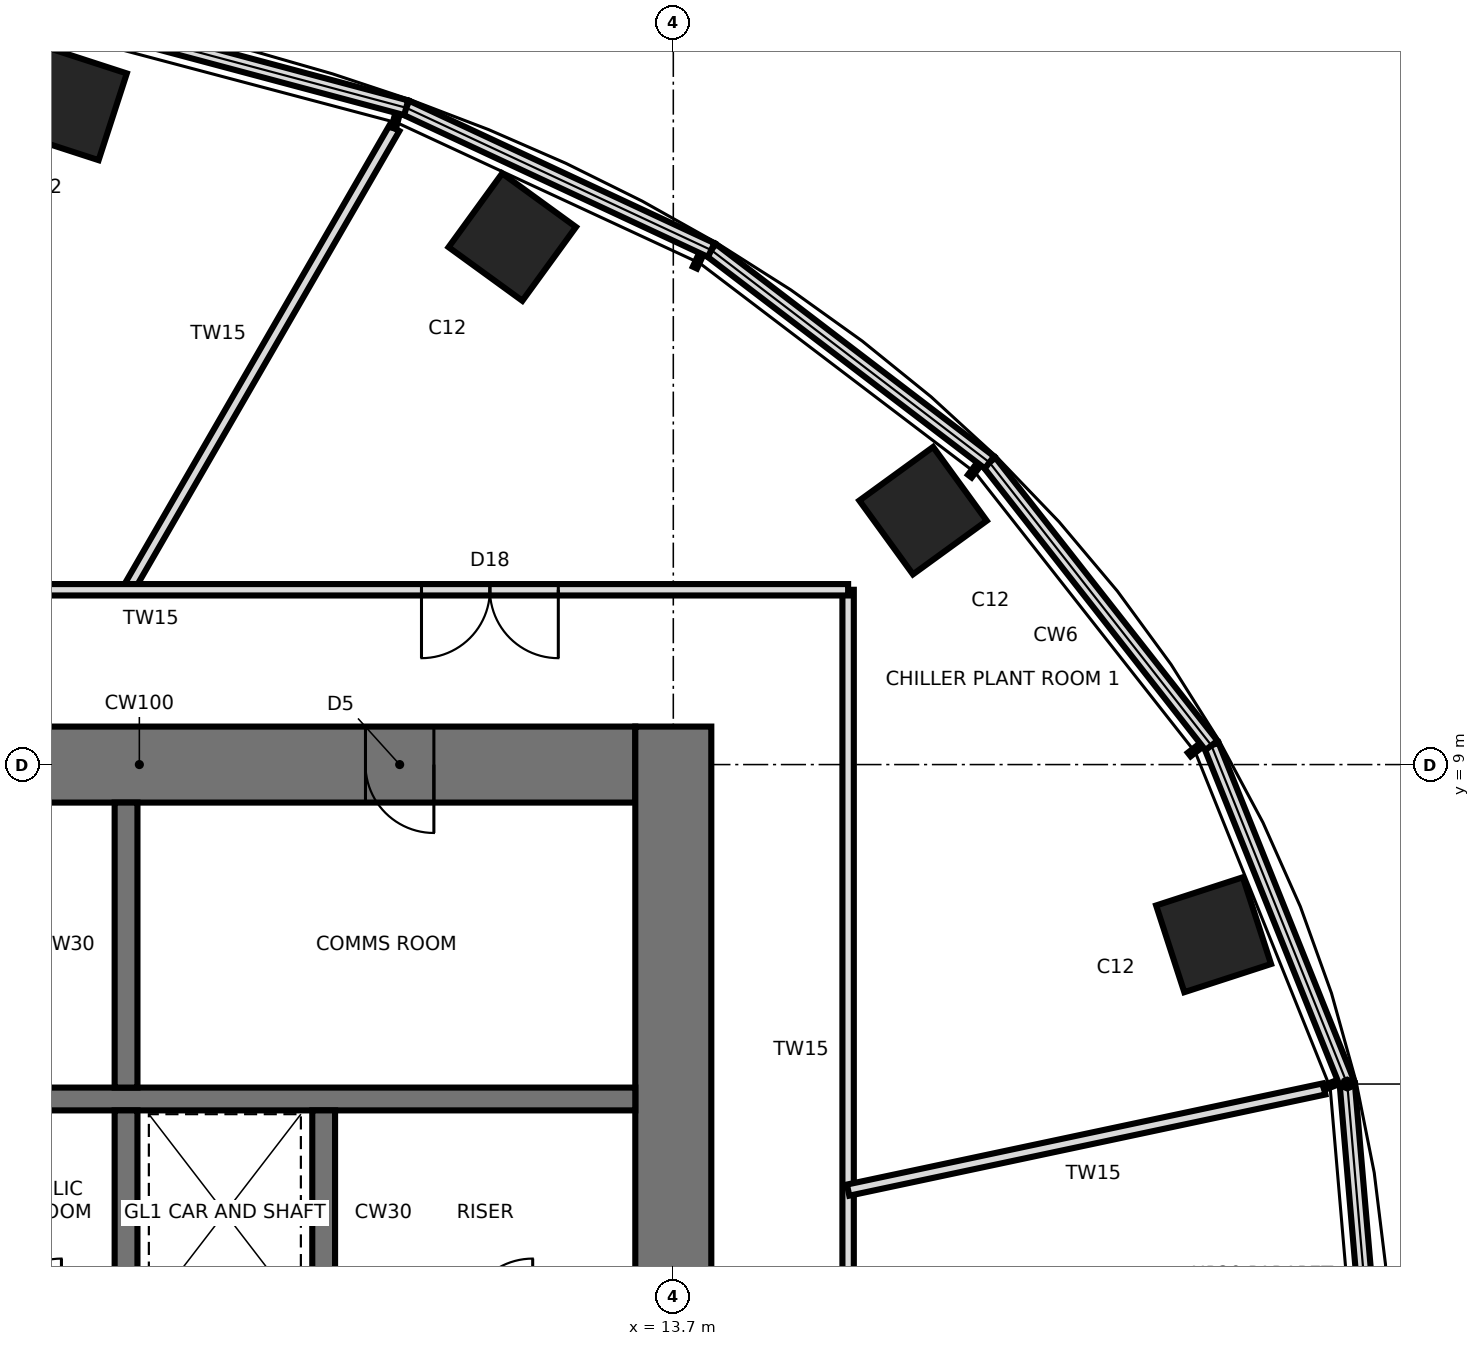
"""IFC4 building model, lengths in metres.
Left out: names, types, materials, properties, quantities, classifications, styles, units other than length and angle.
Written with IfcOpenShell. Run it as: python <this file> out.ifc"""

import sys

from ifc_helpers import new_model, si_unit, direction, frame, frame_2d, origin, origin_2d, place, context, subcontext, project, spatial, rectangle, extrude, element, fill, save


model = new_model("IFC4")
c1 = context("Model", 3, precision=1e-05, world=origin(), true_north=direction((0.0, 1.0)))
c2 = subcontext(c1, "Body", "Model", "MODEL_VIEW")
j1 = project(units=[si_unit("LENGTHUNIT", "METRE"), si_unit("PLANEANGLEUNIT", "RADIAN")], contexts=[c1])
p1 = place(None, origin())
s1 = spatial("IfcSite", under=j1, at=p1, CompositionType="ELEMENT")
p2 = place(p1, origin())
s2 = spatial("IfcBuilding", under=s1, at=p2, CompositionType="ELEMENT")
p3 = place(p2, frame((0.0, 0.0, 277.0)))
s3 = spatial("IfcBuildingStorey", under=s2, at=p3, CompositionType="ELEMENT", Elevation=277.0)
for number, where, z_axis, x_axis in (
    (1, (20.808, 6.761, 0.0), (0.0, 0.0, 1.0), (0.951, 0.309, 0.0)),
    (2, (16.986, 12.341, 0.0), (0.0, 0.0, 1.0), (0.809, 0.588, 0.0)),
    (3, (11.581, 15.94, 0.0), (0.0, 0.0, 1.0), (0.588, 0.809, 0.0)),
    (4, (5.754, 17.708, 0.0), (0.0, 0.0, 1.0), (0.309, 0.951, 0.0)),
):
    element("IfcColumn", number, at=place(p3, frame(where, z_axis=z_axis, x_axis=x_axis)), inside=s3, PredefinedType="COLUMN", context=c2, shape_type="SweptSolid", body=[
        extrude(rectangle(XDim=1.2, YDim=1.2, at=origin_2d()), origin(), (0.0, 0.0, 1.0), 5.0),
    ])
p4 = place(p3, frame((13.2, 9.0, 0.0), z_axis=(0.0, 0.0, 1.0), x_axis=(-1.0, 0.0, 0.0)))
e5 = element("IfcWall", 5, at=p4, inside=s3, PredefinedType="SHEAR", context=c2, shape_type="SweptSolid", body=[
    extrude(rectangle(XDim=26.4, YDim=1.0, at=frame_2d((13.2, 0.0))), origin(), (0.0, 0.0, 1.0), 5.0),
])
p5 = place(p4, frame((2.65, 0.0, 0.0)))
e6 = element("IfcOpeningElement", 6, at=p5, cuts=e5, PredefinedType="OPENING", context=c2, shape_type="SweptSolid", body=[
    extrude(rectangle(XDim=0.9, YDim=2.1, at=frame_2d((0.45, 1.05))), frame((0.0, 0.51, 0.0), z_axis=(0.0, -1.0, 0.0), x_axis=(1.0, 0.0, 0.0)), (0.0, 0.0, 1.0), 1.02),
])
p6 = place(p4, frame((9.5, 0.0, 0.0)))
e7 = element("IfcOpeningElement", 7, at=p6, cuts=e5, PredefinedType="OPENING", context=c2, shape_type="SweptSolid", body=[
    extrude(rectangle(XDim=0.9, YDim=2.1, at=frame_2d((0.45, 1.05))), frame((0.0, 0.51, 0.0), z_axis=(0.0, -1.0, 0.0), x_axis=(1.0, 0.0, 0.0)), (0.0, 0.0, 1.0), 1.02),
])
p7 = place(p4, frame((16.0, 0.0, 0.0)))
e8 = element("IfcOpeningElement", 8, at=p7, cuts=e5, PredefinedType="OPENING", context=c2, shape_type="SweptSolid", body=[
    extrude(rectangle(XDim=0.9, YDim=2.1, at=frame_2d((0.45, 1.05))), frame((0.0, 0.51, 0.0), z_axis=(0.0, -1.0, 0.0), x_axis=(1.0, 0.0, 0.0)), (0.0, 0.0, 1.0), 1.02),
])
p8 = place(p4, frame((21.25, 0.0, 0.0)))
e9 = element("IfcOpeningElement", 9, at=p8, cuts=e5, PredefinedType="OPENING", context=c2, shape_type="SweptSolid", body=[
    extrude(rectangle(XDim=0.9, YDim=2.1, at=frame_2d((0.45, 1.05))), frame((0.0, 0.51, 0.0), z_axis=(0.0, -1.0, 0.0), x_axis=(1.0, 0.0, 0.0)), (0.0, 0.0, 1.0), 1.02),
])
p9 = place(p4, frame((24.8, 0.0, 0.0)))
e10 = element("IfcOpeningElement", 10, at=p9, cuts=e5, PredefinedType="OPENING", context=c2, shape_type="SweptSolid", body=[
    extrude(rectangle(XDim=1.0, YDim=2.1, at=frame_2d((0.5, 1.05))), frame((0.0, 0.51, 0.0), z_axis=(0.0, -1.0, 0.0), x_axis=(1.0, 0.0, 0.0)), (0.0, 0.0, 1.0), 1.02),
])
p10 = place(p3, frame((13.7, -9.5, 0.0), z_axis=(0.0, 0.0, 1.0), x_axis=(0.0, 1.0, 0.0)))
e11 = element("IfcWall", 11, at=p10, inside=s3, PredefinedType="SHEAR", context=c2, shape_type="SweptSolid", body=[
    extrude(rectangle(XDim=19.0, YDim=1.0, at=frame_2d((9.5, 0.0))), origin(), (0.0, 0.0, 1.0), 5.0),
])
p11 = place(p10, frame((8.6, 0.0, 0.0)))
e12 = element("IfcOpeningElement", 12, at=p11, cuts=e11, PredefinedType="OPENING", context=c2, shape_type="SweptSolid", body=[
    extrude(rectangle(XDim=1.8, YDim=2.4, at=frame_2d((0.9, 1.2))), frame((0.0, 0.51, 0.0), z_axis=(0.0, -1.0, 0.0), x_axis=(1.0, 0.0, 0.0)), (0.0, 0.0, 1.0), 1.02),
])
p12 = place(p3, frame((-13.2, 4.6, 0.0), z_axis=(0.0, 0.0, 1.0), x_axis=(1.0, 0.0, 0.0)))
e13 = element("IfcWall", 13, at=p12, inside=s3, PredefinedType="SHEAR", context=c2, shape_type="SweptSolid", body=[
    extrude(rectangle(XDim=26.4, YDim=0.3, at=frame_2d((13.2, 0.0))), origin(), (0.0, 0.0, 1.0), 5.0),
])
p13 = place(p3, frame((6.5, 1.75, 0.0), z_axis=(0.0, 0.0, 1.0), x_axis=(0.0, 1.0, 0.0)))
e14 = element("IfcWall", 14, at=p13, inside=s3, PredefinedType="SHEAR", context=c2, shape_type="SweptSolid", body=[
    extrude(rectangle(XDim=2.7, YDim=0.3, at=frame_2d((1.35, 0.0))), origin(), (0.0, 0.0, 1.0), 5.0),
])
p14 = place(p3, frame((6.5, 4.75, 0.0), z_axis=(0.0, 0.0, 1.0), x_axis=(0.0, 1.0, 0.0)))
e15 = element("IfcWall", 15, at=p14, inside=s3, PredefinedType="SHEAR", context=c2, shape_type="SweptSolid", body=[
    extrude(rectangle(XDim=3.75, YDim=0.3, at=frame_2d((1.875, 0.0))), origin(), (0.0, 0.0, 1.0), 5.0),
])
p15 = place(p3, frame((9.1, 1.75, 0.0), z_axis=(0.0, 0.0, 1.0), x_axis=(0.0, 1.0, 0.0)))
e16 = element("IfcWall", 16, at=p15, inside=s3, PredefinedType="SHEAR", context=c2, shape_type="SweptSolid", body=[
    extrude(rectangle(XDim=2.7, YDim=0.3, at=frame_2d((1.35, 0.0))), origin(), (0.0, 0.0, 1.0), 5.0),
])
p16 = place(p3, frame((22.98, 0.0, 5.0), z_axis=(0.0, 0.0, 1.0), x_axis=(-0.085747752545, 0.996316878776, 0.0)))
e17 = element("IfcWall", 17, at=p16, inside=s3, PredefinedType="PARAPET", context=c2, shape_type="SweptSolid", body=[
    extrude(rectangle(XDim=4.815, YDim=0.2, at=frame_2d((2.407, 0.0))), origin(), (0.0, 0.0, 1.0), 0.4),
])
p17 = place(p3, frame((22.567, 4.797, 5.0), z_axis=(0.0, 0.0, 1.0), x_axis=(-0.372363873994, 0.928086819939, 0.0)))
e18 = element("IfcWall", 18, at=p17, inside=s3, PredefinedType="PARAPET", context=c2, shape_type="SweptSolid", body=[
    extrude(rectangle(XDim=4.8, YDim=0.2, at=frame_2d((2.4, 0.0))), origin(), (0.0, 0.0, 1.0), 0.4),
])
p18 = place(p3, frame((20.78, 9.252, 5.0), z_axis=(0.0, 0.0, 1.0), x_axis=(-0.617103610012, 0.78688190633, 0.0)))
e19 = element("IfcWall", 19, at=p18, inside=s3, PredefinedType="PARAPET", context=c2, shape_type="SweptSolid", body=[
    extrude(rectangle(XDim=4.732, YDim=0.2, at=frame_2d((2.366, 0.0))), origin(), (0.0, 0.0, 1.0), 0.4),
])
p19 = place(p3, frame((17.859, 12.976, 5.0), z_axis=(0.0, 0.0, 1.0), x_axis=(-0.794855686591, 0.606798514743, 0.0)))
e20 = element("IfcWall", 20, at=p19, inside=s3, PredefinedType="PARAPET", context=c2, shape_type="SweptSolid", body=[
    extrude(rectangle(XDim=4.605, YDim=0.2, at=frame_2d((2.302, 0.0))), origin(), (0.0, 0.0, 1.0), 0.4),
])
p20 = place(p3, frame((14.199, 15.77, 5.0), z_axis=(0.0, 0.0, 1.0), x_axis=(-0.906246502857, 0.422749661217, 0.0)))
e21 = element("IfcWall", 21, at=p20, inside=s3, PredefinedType="PARAPET", context=c2, shape_type="SweptSolid", body=[
    extrude(rectangle(XDim=4.429, YDim=0.2, at=frame_2d((2.214, 0.0))), origin(), (0.0, 0.0, 1.0), 0.4),
])
p21 = place(p3, frame((10.186, 17.642, 5.0), z_axis=(0.0, 0.0, 1.0), x_axis=(-0.96617759257, 0.257877605881, 0.0)))
e22 = element("IfcWall", 22, at=p21, inside=s3, PredefinedType="PARAPET", context=c2, shape_type="SweptSolid", body=[
    extrude(rectangle(XDim=4.241, YDim=0.2, at=frame_2d((2.121, 0.0))), origin(), (0.0, 0.0, 1.0), 0.4),
])
p22 = place(p3, frame((16.0, -11.3, 0.0), z_axis=(0.0, 0.0, 1.0), x_axis=(0.0, 1.0, 0.0)))
e23 = element("IfcWall", 23, at=p22, inside=s3, PredefinedType="PARTITIONING", context=c2, shape_type="SweptSolid", body=[
    extrude(rectangle(XDim=22.6, YDim=0.15, at=frame_2d((11.3, 0.0))), origin(), (0.0, 0.0, 1.0), 4.75),
])
p23 = place(p22, frame((8.539, 0.0, 0.0)))
e24 = element("IfcOpeningElement", 24, at=p23, cuts=e23, PredefinedType="OPENING", context=c2, shape_type="SweptSolid", body=[
    extrude(rectangle(XDim=1.8, YDim=2.4, at=frame_2d((0.9, 1.2))), frame((0.0, 0.085, 0.0), z_axis=(0.0, -1.0, 0.0), x_axis=(1.0, 0.0, 0.0)), (0.0, 0.0, 1.0), 0.17),
])
p24 = place(p3, frame((22.264, 4.732, 0.0), z_axis=(0.0, 0.0, 1.0), x_axis=(-0.97814421791, -0.207927605117, 0.0)))
e25 = element("IfcWall", 25, at=p24, inside=s3, PredefinedType="PARTITIONING", context=c2, shape_type="SweptSolid", body=[
    extrude(rectangle(XDim=6.404, YDim=0.15, at=frame_2d((3.202, 0.0))), origin(), (0.0, 0.0, 1.0), 4.75),
])
p25 = place(p3, frame((6.524, 11.3, 0.0), z_axis=(0.0, 0.0, 1.0), x_axis=(0.4999806097, 0.86603659849, 0.0)))
e26 = element("IfcWall", 26, at=p25, inside=s3, PredefinedType="PARTITIONING", context=c2, shape_type="SweptSolid", body=[
    extrude(rectangle(XDim=7.013, YDim=0.15, at=frame_2d((3.506, 0.0))), origin(), (0.0, 0.0, 1.0), 4.75),
])
p26 = place(p3, frame((16.0, 11.3, 0.0), z_axis=(0.0, 0.0, 1.0), x_axis=(-1.0, 0.0, 0.0)))
e27 = element("IfcWall", 27, at=p26, inside=s3, PredefinedType="PARTITIONING", context=c2, shape_type="SweptSolid", body=[
    extrude(rectangle(XDim=32.0, YDim=0.15, at=frame_2d((16.0, 0.0))), origin(), (0.0, 0.0, 1.0), 4.75),
])
p27 = place(p26, frame((3.813, 0.0, 0.0)))
e28 = element("IfcOpeningElement", 28, at=p27, cuts=e27, PredefinedType="OPENING", context=c2, shape_type="SweptSolid", body=[
    extrude(rectangle(XDim=1.8, YDim=2.4, at=frame_2d((0.9, 1.2))), frame((0.0, 0.085, 0.0), z_axis=(0.0, -1.0, 0.0), x_axis=(1.0, 0.0, 0.0)), (0.0, 0.0, 1.0), 0.17),
])
p28 = place(p26, frame((12.732, 0.0, 0.0)))
e29 = element("IfcOpeningElement", 29, at=p28, cuts=e27, PredefinedType="OPENING", context=c2, shape_type="SweptSolid", body=[
    extrude(rectangle(XDim=1.2, YDim=2.1, at=frame_2d((0.6, 1.05))), frame((0.0, 0.085, 0.0), z_axis=(0.0, -1.0, 0.0), x_axis=(1.0, 0.0, 0.0)), (0.0, 0.0, 1.0), 0.17),
])
p29 = place(p26, frame((20.806, 0.0, 0.0)))
e30 = element("IfcOpeningElement", 30, at=p29, cuts=e27, PredefinedType="OPENING", context=c2, shape_type="SweptSolid", body=[
    extrude(rectangle(XDim=1.8, YDim=2.4, at=frame_2d((0.9, 1.2))), frame((0.0, 0.085, 0.0), z_axis=(0.0, -1.0, 0.0), x_axis=(1.0, 0.0, 0.0)), (0.0, 0.0, 1.0), 0.17),
])
p30 = place(p26, frame((28.487, 0.0, 0.0)))
e31 = element("IfcOpeningElement", 31, at=p30, cuts=e27, PredefinedType="OPENING", context=c2, shape_type="SweptSolid", body=[
    extrude(rectangle(XDim=1.2, YDim=2.1, at=frame_2d((0.6, 1.05))), frame((0.0, 0.085, 0.0), z_axis=(0.0, -1.0, 0.0), x_axis=(1.0, 0.0, 0.0)), (0.0, 0.0, 1.0), 0.17),
])
p31 = place(p5, origin())
e32 = element("IfcDoor", 32, at=p31, inside=s3, OperationType="SINGLE_SWING_LEFT", PredefinedType="DOOR", context=c2, shape_type="SweptSolid", body=[
    extrude(rectangle(XDim=0.82, YDim=2.06, at=frame_2d((0.45, 1.03))), frame((0.0, 0.025, 0.0), z_axis=(0.0, -1.0, 0.0), x_axis=(1.0, 0.0, 0.0)), (0.0, 0.0, 1.0), 0.05),
    extrude(rectangle(XDim=0.04, YDim=2.1, at=frame_2d((0.02, 1.05))), frame((0.0, 0.25, 0.0), z_axis=(0.0, -1.0, 0.0), x_axis=(1.0, 0.0, 0.0)), (0.0, 0.0, 1.0), 0.5),
    extrude(rectangle(XDim=0.04, YDim=2.1, at=frame_2d((0.88, 1.05))), frame((0.0, 0.25, 0.0), z_axis=(0.0, -1.0, 0.0), x_axis=(1.0, 0.0, 0.0)), (0.0, 0.0, 1.0), 0.5),
    extrude(rectangle(XDim=0.82, YDim=0.04, at=frame_2d((0.45, 2.08))), frame((0.0, 0.25, 0.0), z_axis=(0.0, -1.0, 0.0), x_axis=(1.0, 0.0, 0.0)), (0.0, 0.0, 1.0), 0.5),
])
fill(e6, e32)
p32 = place(p27, origin())
e33 = element("IfcDoor", 33, at=p32, inside=s3, OperationType="DOUBLE_DOOR_SINGLE_SWING", PredefinedType="DOOR", context=c2, shape_type="SweptSolid", body=[
    extrude(rectangle(XDim=1.8, YDim=2.4, at=frame_2d((0.9, 1.2))), frame((0.0, 0.025, 0.0), z_axis=(0.0, -1.0, 0.0), x_axis=(1.0, 0.0, 0.0)), (0.0, 0.0, 1.0), 0.05),
])
fill(e28, e33)
save(model, sys.argv[1])
